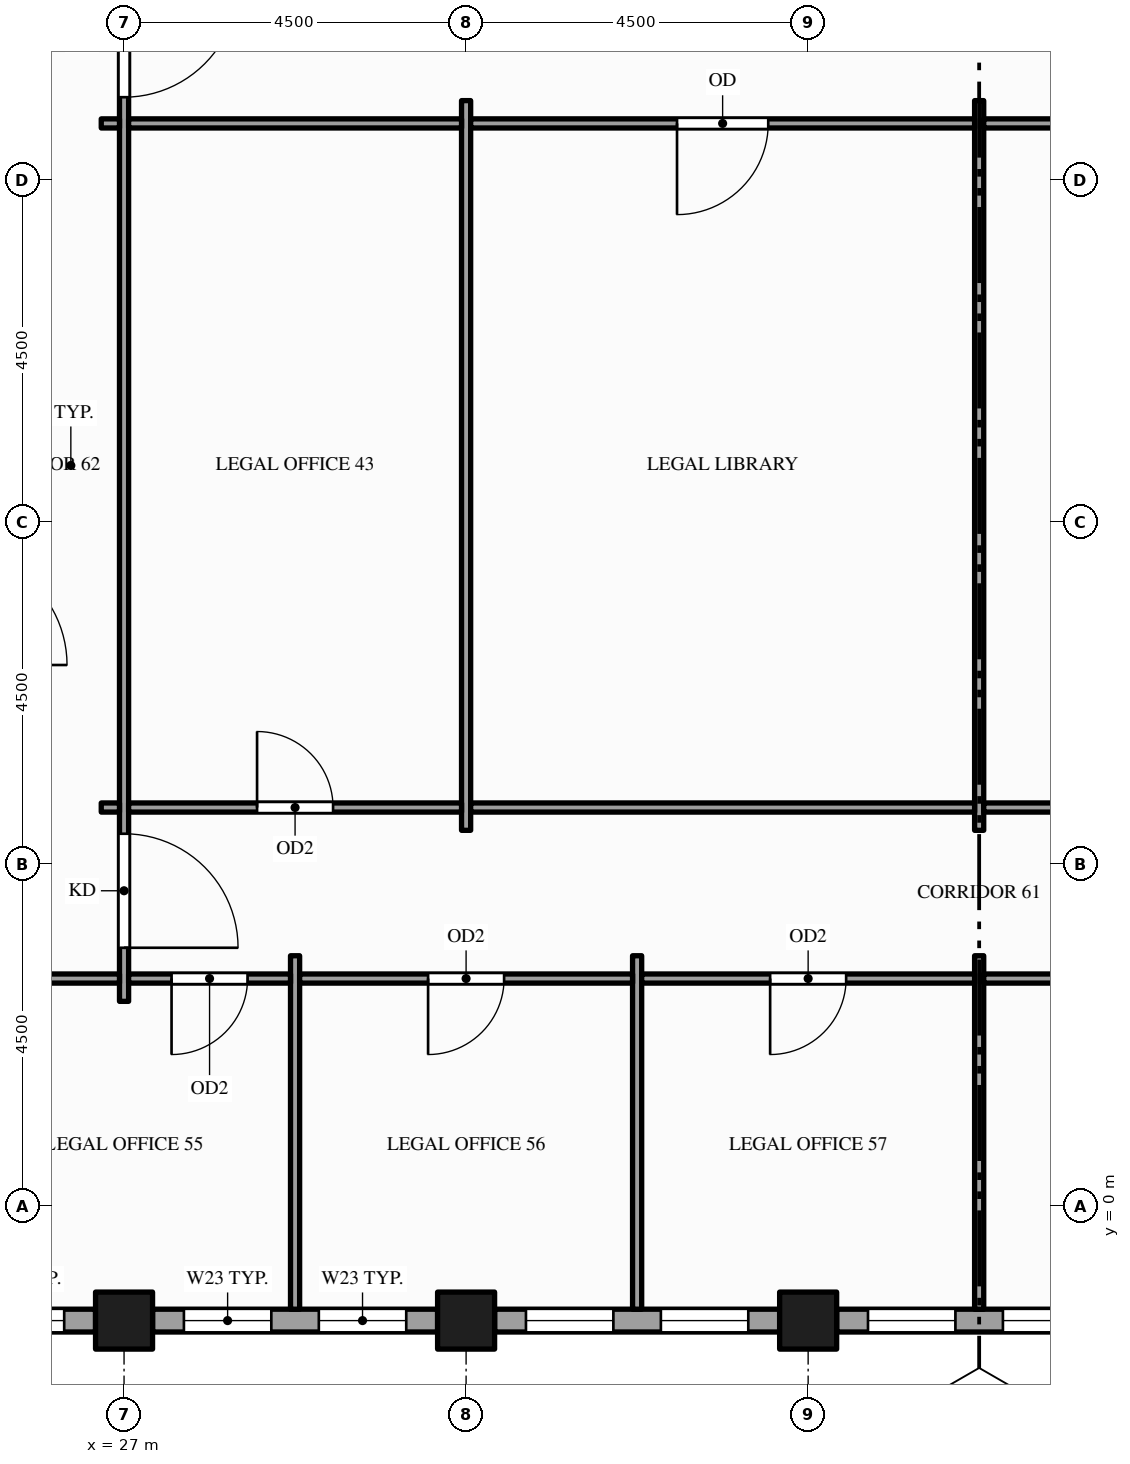
"""IFC4 building model, lengths in metres.
Left out: names, types, materials, properties, quantities, classifications, styles, units other than length and angle.
Written with IfcOpenShell. Run it as: python <this file> out.ifc"""

import sys

from ifc_helpers import new_model, si_unit, direction, frame, frame_2d, origin, origin_2d, place, context, subcontext, project, spatial, rectangle, hollow_rectangle, extrude, element, fill, save


model = new_model("IFC4")
c1 = context("Model", 3, precision=1e-05, world=origin(), true_north=direction((0.0, 1.0)))
c2 = subcontext(c1, "Body", "Model", "MODEL_VIEW")
j1 = project(units=[si_unit("LENGTHUNIT", "METRE"), si_unit("PLANEANGLEUNIT", "RADIAN")], contexts=[c1])
p1 = place(None, origin())
s1 = spatial("IfcSite", under=j1, at=p1, CompositionType="ELEMENT")
p2 = place(p1, origin())
s2 = spatial("IfcBuilding", under=s1, at=p2, CompositionType="ELEMENT")
p3 = place(p2, frame((0.0, 0.0, 215.0)))
s3 = spatial("IfcBuildingStorey", under=s2, at=p3, CompositionType="ELEMENT", Elevation=215.0)
for number, where, z_axis, x_axis in (
    (1, (27.0, -1.5, -0.15), (0.0, 0.0, 1.0), (1.0, 0.0, 0.0)),
    (2, (31.5, -1.5, -0.15), (0.0, 0.0, 1.0), (1.0, 0.0, 0.0)),
    (3, (36.0, -1.5, -0.15), (0.0, 0.0, 1.0), (1.0, 0.0, 0.0)),
):
    element("IfcColumn", number, at=place(p3, frame(where, z_axis=z_axis, x_axis=x_axis)), inside=s3, PredefinedType="COLUMN", context=c2, shape_type="SweptSolid", body=[
        extrude(hollow_rectangle(XDim=0.75, YDim=0.75, WallThickness=0.036, at=origin_2d()), origin(), (0.0, 0.0, 1.0), 4.0),
    ])
p4 = place(p3, frame((22.875, -1.5, 0.0), z_axis=(0.0, 0.0, 1.0), x_axis=(1.0, 0.0, 0.0)))
e4 = element("IfcWall", 4, at=p4, inside=s3, PredefinedType="STANDARD", context=c2, shape_type="SweptSolid", body=[
    extrude(rectangle(XDim=3.75, YDim=0.3, at=frame_2d((1.875, 0.0))), origin(), (0.0, 0.0, 1.0), 2.76),
])
p5 = place(p4, frame((0.413, 0.0, 0.9)))
e5 = element("IfcOpeningElement", 5, at=p5, cuts=e4, PredefinedType="OPENING", context=c2, shape_type="SweptSolid", body=[
    extrude(rectangle(XDim=1.15, YDim=1.5, at=frame_2d((0.575, 0.75))), frame((0.0, 0.16, 0.0), z_axis=(0.0, -1.0, 0.0), x_axis=(1.0, 0.0, 0.0)), (0.0, 0.0, 1.0), 0.32),
])
p6 = place(p4, frame((2.188, 0.0, 0.9)))
e6 = element("IfcOpeningElement", 6, at=p6, cuts=e4, PredefinedType="OPENING", context=c2, shape_type="SweptSolid", body=[
    extrude(rectangle(XDim=1.15, YDim=1.5, at=frame_2d((0.575, 0.75))), frame((0.0, 0.16, 0.0), z_axis=(0.0, -1.0, 0.0), x_axis=(1.0, 0.0, 0.0)), (0.0, 0.0, 1.0), 0.32),
])
p7 = place(p3, frame((27.375, -1.5, 0.0), z_axis=(0.0, 0.0, 1.0), x_axis=(1.0, 0.0, 0.0)))
e7 = element("IfcWall", 7, at=p7, inside=s3, PredefinedType="STANDARD", context=c2, shape_type="SweptSolid", body=[
    extrude(rectangle(XDim=3.75, YDim=0.3, at=frame_2d((1.875, 0.0))), origin(), (0.0, 0.0, 1.0), 2.87),
])
p8 = place(p7, frame((0.413, 0.0, 0.9)))
e8 = element("IfcOpeningElement", 8, at=p8, cuts=e7, PredefinedType="OPENING", context=c2, shape_type="SweptSolid", body=[
    extrude(rectangle(XDim=1.15, YDim=1.75, at=frame_2d((0.575, 0.875))), frame((0.0, 0.16, 0.0), z_axis=(0.0, -1.0, 0.0), x_axis=(1.0, 0.0, 0.0)), (0.0, 0.0, 1.0), 0.32),
])
p9 = place(p7, frame((2.188, 0.0, 0.9)))
e9 = element("IfcOpeningElement", 9, at=p9, cuts=e7, PredefinedType="OPENING", context=c2, shape_type="SweptSolid", body=[
    extrude(rectangle(XDim=1.15, YDim=1.75, at=frame_2d((0.575, 0.875))), frame((0.0, 0.16, 0.0), z_axis=(0.0, -1.0, 0.0), x_axis=(1.0, 0.0, 0.0)), (0.0, 0.0, 1.0), 0.32),
])
p10 = place(p3, frame((31.875, -1.5, 0.0), z_axis=(0.0, 0.0, 1.0), x_axis=(1.0, 0.0, 0.0)))
e10 = element("IfcWall", 10, at=p10, inside=s3, PredefinedType="STANDARD", context=c2, shape_type="SweptSolid", body=[
    extrude(rectangle(XDim=3.75, YDim=0.3, at=frame_2d((1.875, 0.0))), origin(), (0.0, 0.0, 1.0), 2.87),
])
p11 = place(p10, frame((0.413, 0.0, 0.9)))
e11 = element("IfcOpeningElement", 11, at=p11, cuts=e10, PredefinedType="OPENING", context=c2, shape_type="SweptSolid", body=[
    extrude(rectangle(XDim=1.15, YDim=1.75, at=frame_2d((0.575, 0.875))), frame((0.0, 0.16, 0.0), z_axis=(0.0, -1.0, 0.0), x_axis=(1.0, 0.0, 0.0)), (0.0, 0.0, 1.0), 0.32),
])
p12 = place(p10, frame((2.188, 0.0, 0.9)))
e12 = element("IfcOpeningElement", 12, at=p12, cuts=e10, PredefinedType="OPENING", context=c2, shape_type="SweptSolid", body=[
    extrude(rectangle(XDim=1.15, YDim=1.75, at=frame_2d((0.575, 0.875))), frame((0.0, 0.16, 0.0), z_axis=(0.0, -1.0, 0.0), x_axis=(1.0, 0.0, 0.0)), (0.0, 0.0, 1.0), 0.32),
])
p13 = place(p3, frame((36.375, -1.5, 0.0), z_axis=(0.0, 0.0, 1.0), x_axis=(1.0, 0.0, 0.0)))
e13 = element("IfcWall", 13, at=p13, inside=s3, PredefinedType="STANDARD", context=c2, shape_type="SweptSolid", body=[
    extrude(rectangle(XDim=3.75, YDim=0.3, at=frame_2d((1.875, 0.0))), origin(), (0.0, 0.0, 1.0), 2.87),
])
p14 = place(p13, frame((0.413, 0.0, 0.9)))
e14 = element("IfcOpeningElement", 14, at=p14, cuts=e13, PredefinedType="OPENING", context=c2, shape_type="SweptSolid", body=[
    extrude(rectangle(XDim=1.15, YDim=1.75, at=frame_2d((0.575, 0.875))), frame((0.0, 0.16, 0.0), z_axis=(0.0, -1.0, 0.0), x_axis=(1.0, 0.0, 0.0)), (0.0, 0.0, 1.0), 0.32),
])
p15 = place(p13, frame((2.188, 0.0, 0.9)))
e15 = element("IfcOpeningElement", 15, at=p15, cuts=e13, PredefinedType="OPENING", context=c2, shape_type="SweptSolid", body=[
    extrude(rectangle(XDim=1.15, YDim=1.75, at=frame_2d((0.575, 0.875))), frame((0.0, 0.16, 0.0), z_axis=(0.0, -1.0, 0.0), x_axis=(1.0, 0.0, 0.0)), (0.0, 0.0, 1.0), 0.32),
])
p16 = place(p3, frame((27.0, 2.7, 0.0), z_axis=(0.0, 0.0, 1.0), x_axis=(0.0, 1.0, 0.0)))
e16 = element("IfcWall", 16, at=p16, inside=s3, PredefinedType="PARTITIONING", context=c2, shape_type="SweptSolid", body=[
    extrude(rectangle(XDim=14.1, YDim=0.12, at=frame_2d((7.05, 0.0))), origin(), (0.0, 0.0, 1.0), 2.87),
])
p17 = place(p16, frame((0.705, 0.0, 0.0)))
e17 = element("IfcOpeningElement", 17, at=p17, cuts=e16, PredefinedType="OPENING", context=c2, shape_type="SweptSolid", body=[
    extrude(rectangle(XDim=1.5, YDim=2.1, at=frame_2d((0.75, 1.05))), frame((0.0, 0.07, 0.0), z_axis=(0.0, -1.0, 0.0), x_axis=(1.0, 0.0, 0.0)), (0.0, 0.0, 1.0), 0.14),
])
p18 = place(p16, frame((11.895, 0.0, 0.0)))
e18 = element("IfcOpeningElement", 18, at=p18, cuts=e16, PredefinedType="OPENING", context=c2, shape_type="SweptSolid", body=[
    extrude(rectangle(XDim=1.5, YDim=2.1, at=frame_2d((0.75, 1.05))), frame((0.0, 0.07, 0.0), z_axis=(0.0, -1.0, 0.0), x_axis=(1.0, 0.0, 0.0)), (0.0, 0.0, 1.0), 0.14),
])
p19 = place(p3, frame((29.25, -1.35, 0.0), z_axis=(0.0, 0.0, 1.0), x_axis=(0.0, 1.0, 0.0)))
e19 = element("IfcWall", 19, at=p19, inside=s3, PredefinedType="PARTITIONING", context=c2, shape_type="SweptSolid", body=[
    extrude(rectangle(XDim=4.65, YDim=0.12, at=frame_2d((2.325, 0.0))), origin(), (0.0, 0.0, 1.0), 2.87),
])
p20 = place(p3, frame((31.5, 4.95, 0.0), z_axis=(0.0, 0.0, 1.0), x_axis=(0.0, 1.0, 0.0)))
e20 = element("IfcWall", 20, at=p20, inside=s3, PredefinedType="PARTITIONING", context=c2, shape_type="SweptSolid", body=[
    extrude(rectangle(XDim=9.6, YDim=0.12, at=frame_2d((4.8, 0.0))), origin(), (0.0, 0.0, 1.0), 2.87),
])
for number, where, z_axis, x_axis in (
    (21, (33.75, -1.35, 0.0), (0.0, 0.0, 1.0), (0.0, 1.0, 0.0)),
    (22, (38.25, -1.35, 0.0), (0.0, 0.0, 1.0), (0.0, 1.0, 0.0)),
):
    element("IfcWall", number, at=place(p3, frame(where, z_axis=z_axis, x_axis=x_axis)), inside=s3, PredefinedType="PARTITIONING", context=c2, shape_type="SweptSolid", body=[
        extrude(rectangle(XDim=4.65, YDim=0.12, at=frame_2d((2.325, 0.0))), origin(), (0.0, 0.0, 1.0), 2.87),
    ])
p21 = place(p3, frame((38.25, 4.95, 0.0), z_axis=(0.0, 0.0, 1.0), x_axis=(0.0, 1.0, 0.0)))
e23 = element("IfcWall", 23, at=p21, inside=s3, PredefinedType="PARTITIONING", context=c2, shape_type="SweptSolid", body=[
    extrude(rectangle(XDim=9.6, YDim=0.12, at=frame_2d((4.8, 0.0))), origin(), (0.0, 0.0, 1.0), 2.87),
])
p22 = place(p3, frame((24.81, 3.0, 0.0), z_axis=(0.0, 0.0, 1.0), x_axis=(1.0, 0.0, 0.0)))
e24 = element("IfcWall", 24, at=p22, inside=s3, PredefinedType="PARTITIONING", context=c2, shape_type="SweptSolid", body=[
    extrude(rectangle(XDim=2.13, YDim=0.12, at=frame_2d((1.065, 0.0))), origin(), (0.0, 0.0, 1.0), 2.76),
])
p23 = place(p3, frame((27.06, 3.0, 0.0), z_axis=(0.0, 0.0, 1.0), x_axis=(1.0, 0.0, 0.0)))
e25 = element("IfcWall", 25, at=p23, inside=s3, PredefinedType="PARTITIONING", context=c2, shape_type="SweptSolid", body=[
    extrude(rectangle(XDim=2.13, YDim=0.12, at=frame_2d((1.065, 0.0))), origin(), (0.0, 0.0, 1.0), 2.87),
])
p24 = place(p23, frame((0.565, 0.0, 0.0)))
e26 = element("IfcOpeningElement", 26, at=p24, cuts=e25, PredefinedType="OPENING", context=c2, shape_type="SweptSolid", body=[
    extrude(rectangle(XDim=1.0, YDim=2.1, at=frame_2d((0.5, 1.05))), frame((0.0, 0.07, 0.0), z_axis=(0.0, -1.0, 0.0), x_axis=(1.0, 0.0, 0.0)), (0.0, 0.0, 1.0), 0.14),
])
p25 = place(p3, frame((29.31, 3.0, 0.0), z_axis=(0.0, 0.0, 1.0), x_axis=(1.0, 0.0, 0.0)))
e27 = element("IfcWall", 27, at=p25, inside=s3, PredefinedType="PARTITIONING", context=c2, shape_type="SweptSolid", body=[
    extrude(rectangle(XDim=4.38, YDim=0.12, at=frame_2d((2.19, 0.0))), origin(), (0.0, 0.0, 1.0), 2.87),
])
p26 = place(p25, frame((1.69, 0.0, 0.0)))
e28 = element("IfcOpeningElement", 28, at=p26, cuts=e27, PredefinedType="OPENING", context=c2, shape_type="SweptSolid", body=[
    extrude(rectangle(XDim=1.0, YDim=2.1, at=frame_2d((0.5, 1.05))), frame((0.0, 0.07, 0.0), z_axis=(0.0, -1.0, 0.0), x_axis=(1.0, 0.0, 0.0)), (0.0, 0.0, 1.0), 0.14),
])
p27 = place(p3, frame((33.81, 3.0, 0.0), z_axis=(0.0, 0.0, 1.0), x_axis=(1.0, 0.0, 0.0)))
e29 = element("IfcWall", 29, at=p27, inside=s3, PredefinedType="PARTITIONING", context=c2, shape_type="SweptSolid", body=[
    extrude(rectangle(XDim=4.38, YDim=0.12, at=frame_2d((2.19, 0.0))), origin(), (0.0, 0.0, 1.0), 2.87),
])
p28 = place(p27, frame((1.69, 0.0, 0.0)))
e30 = element("IfcOpeningElement", 30, at=p28, cuts=e29, PredefinedType="OPENING", context=c2, shape_type="SweptSolid", body=[
    extrude(rectangle(XDim=1.0, YDim=2.1, at=frame_2d((0.5, 1.05))), frame((0.0, 0.07, 0.0), z_axis=(0.0, -1.0, 0.0), x_axis=(1.0, 0.0, 0.0)), (0.0, 0.0, 1.0), 0.14),
])
p29 = place(p3, frame((38.31, 3.0, 0.0), z_axis=(0.0, 0.0, 1.0), x_axis=(1.0, 0.0, 0.0)))
e31 = element("IfcWall", 31, at=p29, inside=s3, PredefinedType="PARTITIONING", context=c2, shape_type="SweptSolid", body=[
    extrude(rectangle(XDim=4.38, YDim=0.12, at=frame_2d((2.19, 0.0))), origin(), (0.0, 0.0, 1.0), 2.87),
])
p30 = place(p29, frame((1.69, 0.0, 0.0)))
e32 = element("IfcOpeningElement", 32, at=p30, cuts=e31, PredefinedType="OPENING", context=c2, shape_type="SweptSolid", body=[
    extrude(rectangle(XDim=1.0, YDim=2.1, at=frame_2d((0.5, 1.05))), frame((0.0, 0.07, 0.0), z_axis=(0.0, -1.0, 0.0), x_axis=(1.0, 0.0, 0.0)), (0.0, 0.0, 1.0), 0.14),
])
p31 = place(p3, frame((26.7, 5.25, 0.0), z_axis=(0.0, 0.0, 1.0), x_axis=(1.0, 0.0, 0.0)))
e33 = element("IfcWall", 33, at=p31, inside=s3, PredefinedType="PARTITIONING", context=c2, shape_type="SweptSolid", body=[
    extrude(rectangle(XDim=0.24, YDim=0.12, at=frame_2d((0.12, 0.0))), origin(), (0.0, 0.0, 1.0), 2.87),
])
p32 = place(p3, frame((27.06, 5.25, 0.0), z_axis=(0.0, 0.0, 1.0), x_axis=(1.0, 0.0, 0.0)))
e34 = element("IfcWall", 34, at=p32, inside=s3, PredefinedType="PARTITIONING", context=c2, shape_type="SweptSolid", body=[
    extrude(rectangle(XDim=4.38, YDim=0.12, at=frame_2d((2.19, 0.0))), origin(), (0.0, 0.0, 1.0), 2.87),
])
p33 = place(p32, frame((1.69, 0.0, 0.0)))
e35 = element("IfcOpeningElement", 35, at=p33, cuts=e34, PredefinedType="OPENING", context=c2, shape_type="SweptSolid", body=[
    extrude(rectangle(XDim=1.0, YDim=2.1, at=frame_2d((0.5, 1.05))), frame((0.0, 0.07, 0.0), z_axis=(0.0, -1.0, 0.0), x_axis=(1.0, 0.0, 0.0)), (0.0, 0.0, 1.0), 0.14),
])
p34 = place(p3, frame((31.56, 5.25, 0.0), z_axis=(0.0, 0.0, 1.0), x_axis=(1.0, 0.0, 0.0)))
e36 = element("IfcWall", 36, at=p34, inside=s3, PredefinedType="PARTITIONING", context=c2, shape_type="SweptSolid", body=[
    extrude(rectangle(XDim=6.63, YDim=0.12, at=frame_2d((3.315, 0.0))), origin(), (0.0, 0.0, 1.0), 2.87),
])
p35 = place(p3, frame((38.31, 5.25, 0.0), z_axis=(0.0, 0.0, 1.0), x_axis=(1.0, 0.0, 0.0)))
e37 = element("IfcWall", 37, at=p35, inside=s3, PredefinedType="PARTITIONING", context=c2, shape_type="SweptSolid", body=[
    extrude(rectangle(XDim=6.63, YDim=0.12, at=frame_2d((3.315, 0.0))), origin(), (0.0, 0.0, 1.0), 2.87),
])
p36 = place(p35, frame((2.865, 0.0, 0.0)))
e38 = element("IfcOpeningElement", 38, at=p36, cuts=e37, PredefinedType="OPENING", context=c2, shape_type="SweptSolid", body=[
    extrude(rectangle(XDim=0.9, YDim=2.1, at=frame_2d((0.45, 1.05))), frame((0.0, 0.07, 0.0), z_axis=(0.0, -1.0, 0.0), x_axis=(1.0, 0.0, 0.0)), (0.0, 0.0, 1.0), 0.14),
])
p37 = place(p3, frame((26.7, 14.25, 0.0), z_axis=(0.0, 0.0, 1.0), x_axis=(1.0, 0.0, 0.0)))
e39 = element("IfcWall", 39, at=p37, inside=s3, PredefinedType="PARTITIONING", context=c2, shape_type="SweptSolid", body=[
    extrude(rectangle(XDim=0.24, YDim=0.12, at=frame_2d((0.12, 0.0))), origin(), (0.0, 0.0, 1.0), 2.87),
])
p38 = place(p3, frame((27.06, 14.25, 0.0), z_axis=(0.0, 0.0, 1.0), x_axis=(1.0, 0.0, 0.0)))
e40 = element("IfcWall", 40, at=p38, inside=s3, PredefinedType="PARTITIONING", context=c2, shape_type="SweptSolid", body=[
    extrude(rectangle(XDim=4.38, YDim=0.12, at=frame_2d((2.19, 0.0))), origin(), (0.0, 0.0, 1.0), 2.87),
])
p39 = place(p3, frame((31.56, 14.25, 0.0), z_axis=(0.0, 0.0, 1.0), x_axis=(1.0, 0.0, 0.0)))
e41 = element("IfcWall", 41, at=p39, inside=s3, PredefinedType="PARTITIONING", context=c2, shape_type="SweptSolid", body=[
    extrude(rectangle(XDim=6.63, YDim=0.12, at=frame_2d((3.315, 0.0))), origin(), (0.0, 0.0, 1.0), 2.87),
])
p40 = place(p39, frame((2.715, 0.0, 0.0)))
e42 = element("IfcOpeningElement", 42, at=p40, cuts=e41, PredefinedType="OPENING", context=c2, shape_type="SweptSolid", body=[
    extrude(rectangle(XDim=1.2, YDim=2.1, at=frame_2d((0.6, 1.05))), frame((0.0, 0.07, 0.0), z_axis=(0.0, -1.0, 0.0), x_axis=(1.0, 0.0, 0.0)), (0.0, 0.0, 1.0), 0.14),
])
p41 = place(p3, frame((38.31, 14.25, 0.0), z_axis=(0.0, 0.0, 1.0), x_axis=(1.0, 0.0, 0.0)))
e43 = element("IfcWall", 43, at=p41, inside=s3, PredefinedType="PARTITIONING", context=c2, shape_type="SweptSolid", body=[
    extrude(rectangle(XDim=6.63, YDim=0.12, at=frame_2d((3.315, 0.0))), origin(), (0.0, 0.0, 1.0), 2.87),
])
p42 = place(p6, origin())
e44 = element("IfcWindow", 44, at=p42, inside=s3, PartitioningType="SINGLE_PANEL", PredefinedType="WINDOW", context=c2, shape_type="SweptSolid", body=[
    extrude(rectangle(XDim=1.15, YDim=1.5, at=frame_2d((0.575, 0.75))), frame((0.0, 0.03, 0.0), z_axis=(0.0, -1.0, 0.0), x_axis=(1.0, 0.0, 0.0)), (0.0, 0.0, 1.0), 0.06),
])
fill(e6, e44)
p43 = place(p8, origin())
e45 = element("IfcWindow", 45, at=p43, inside=s3, PartitioningType="SINGLE_PANEL", PredefinedType="WINDOW", context=c2, shape_type="SweptSolid", body=[
    extrude(rectangle(XDim=1.15, YDim=1.75, at=frame_2d((0.575, 0.875))), frame((0.0, 0.03, 0.0), z_axis=(0.0, -1.0, 0.0), x_axis=(1.0, 0.0, 0.0)), (0.0, 0.0, 1.0), 0.06),
])
fill(e8, e45)
p44 = place(p9, origin())
e46 = element("IfcWindow", 46, at=p44, inside=s3, PartitioningType="SINGLE_PANEL", PredefinedType="WINDOW", context=c2, shape_type="SweptSolid", body=[
    extrude(rectangle(XDim=1.15, YDim=1.75, at=frame_2d((0.575, 0.875))), frame((0.0, 0.03, 0.0), z_axis=(0.0, -1.0, 0.0), x_axis=(1.0, 0.0, 0.0)), (0.0, 0.0, 1.0), 0.06),
])
fill(e9, e46)
p45 = place(p11, origin())
e47 = element("IfcWindow", 47, at=p45, inside=s3, PartitioningType="SINGLE_PANEL", PredefinedType="WINDOW", context=c2, shape_type="SweptSolid", body=[
    extrude(rectangle(XDim=1.15, YDim=1.75, at=frame_2d((0.575, 0.875))), frame((0.0, 0.03, 0.0), z_axis=(0.0, -1.0, 0.0), x_axis=(1.0, 0.0, 0.0)), (0.0, 0.0, 1.0), 0.06),
])
fill(e11, e47)
p46 = place(p12, origin())
e48 = element("IfcWindow", 48, at=p46, inside=s3, PartitioningType="SINGLE_PANEL", PredefinedType="WINDOW", context=c2, shape_type="SweptSolid", body=[
    extrude(rectangle(XDim=1.15, YDim=1.75, at=frame_2d((0.575, 0.875))), frame((0.0, 0.03, 0.0), z_axis=(0.0, -1.0, 0.0), x_axis=(1.0, 0.0, 0.0)), (0.0, 0.0, 1.0), 0.06),
])
fill(e12, e48)
p47 = place(p14, origin())
e49 = element("IfcWindow", 49, at=p47, inside=s3, PartitioningType="SINGLE_PANEL", PredefinedType="WINDOW", context=c2, shape_type="SweptSolid", body=[
    extrude(rectangle(XDim=1.15, YDim=1.75, at=frame_2d((0.575, 0.875))), frame((0.0, 0.03, 0.0), z_axis=(0.0, -1.0, 0.0), x_axis=(1.0, 0.0, 0.0)), (0.0, 0.0, 1.0), 0.06),
])
fill(e14, e49)
p48 = place(p15, origin())
e50 = element("IfcWindow", 50, at=p48, inside=s3, PartitioningType="SINGLE_PANEL", PredefinedType="WINDOW", context=c2, shape_type="SweptSolid", body=[
    extrude(rectangle(XDim=1.15, YDim=1.75, at=frame_2d((0.575, 0.875))), frame((0.0, 0.03, 0.0), z_axis=(0.0, -1.0, 0.0), x_axis=(1.0, 0.0, 0.0)), (0.0, 0.0, 1.0), 0.06),
])
fill(e15, e50)
p49 = place(p17, origin())
e51 = element("IfcDoor", 51, at=p49, inside=s3, OperationType="SINGLE_SWING_LEFT", PredefinedType="DOOR", context=c2, shape_type="SweptSolid", body=[
    extrude(rectangle(XDim=1.5, YDim=2.1, at=frame_2d((0.75, 1.05))), frame((0.0, 0.025, 0.0), z_axis=(0.0, -1.0, 0.0), x_axis=(1.0, 0.0, 0.0)), (0.0, 0.0, 1.0), 0.05),
])
fill(e17, e51)
p50 = place(p18, origin())
e52 = element("IfcDoor", 52, at=p50, inside=s3, OperationType="SINGLE_SWING_RIGHT", PredefinedType="DOOR", context=c2, shape_type="SweptSolid", body=[
    extrude(rectangle(XDim=1.5, YDim=2.1, at=frame_2d((0.75, 1.05))), frame((0.0, 0.025, 0.0), z_axis=(0.0, -1.0, 0.0), x_axis=(1.0, 0.0, 0.0)), (0.0, 0.0, 1.0), 0.05),
])
fill(e18, e52)
p51 = place(p33, origin())
e53 = element("IfcDoor", 53, at=p51, inside=s3, OperationType="SINGLE_SWING_LEFT", PredefinedType="DOOR", context=c2, shape_type="SweptSolid", body=[
    extrude(rectangle(XDim=1.0, YDim=2.1, at=frame_2d((0.5, 1.05))), frame((0.0, 0.025, 0.0), z_axis=(0.0, -1.0, 0.0), x_axis=(1.0, 0.0, 0.0)), (0.0, 0.0, 1.0), 0.05),
])
fill(e35, e53)
p52 = place(p40, origin())
e54 = element("IfcDoor", 54, at=p52, inside=s3, OperationType="SINGLE_SWING_LEFT", PredefinedType="DOOR", context=c2, shape_type="SweptSolid", body=[
    extrude(rectangle(XDim=1.2, YDim=2.1, at=frame_2d((0.6, 1.05))), frame((0.0, 0.025, 0.0), z_axis=(0.0, -1.0, 0.0), x_axis=(1.0, 0.0, 0.0)), (0.0, 0.0, 1.0), 0.05),
])
fill(e42, e54)
p53 = place(p24, origin())
e55 = element("IfcDoor", 55, at=p53, inside=s3, OperationType="SINGLE_SWING_LEFT", PredefinedType="DOOR", context=c2, shape_type="SweptSolid", body=[
    extrude(rectangle(XDim=1.0, YDim=2.1, at=frame_2d((0.5, 1.05))), frame((0.0, 0.025, 0.0), z_axis=(0.0, -1.0, 0.0), x_axis=(1.0, 0.0, 0.0)), (0.0, 0.0, 1.0), 0.05),
])
fill(e26, e55)
p54 = place(p26, origin())
e56 = element("IfcDoor", 56, at=p54, inside=s3, OperationType="SINGLE_SWING_LEFT", PredefinedType="DOOR", context=c2, shape_type="SweptSolid", body=[
    extrude(rectangle(XDim=1.0, YDim=2.1, at=frame_2d((0.5, 1.05))), frame((0.0, 0.025, 0.0), z_axis=(0.0, -1.0, 0.0), x_axis=(1.0, 0.0, 0.0)), (0.0, 0.0, 1.0), 0.05),
])
fill(e28, e56)
p55 = place(p28, origin())
e57 = element("IfcDoor", 57, at=p55, inside=s3, OperationType="SINGLE_SWING_LEFT", PredefinedType="DOOR", context=c2, shape_type="SweptSolid", body=[
    extrude(rectangle(XDim=1.0, YDim=2.1, at=frame_2d((0.5, 1.05))), frame((0.0, 0.025, 0.0), z_axis=(0.0, -1.0, 0.0), x_axis=(1.0, 0.0, 0.0)), (0.0, 0.0, 1.0), 0.05),
])
fill(e30, e57)
save(model, sys.argv[1])
